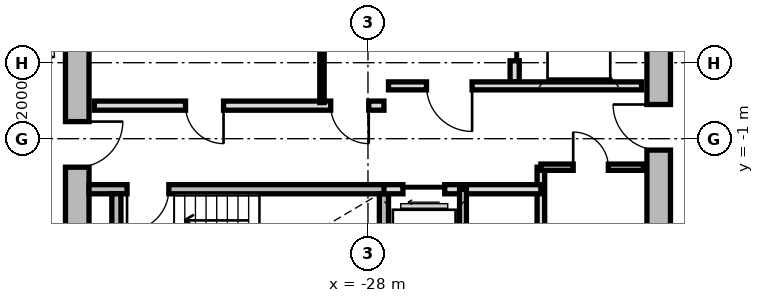
"""IFC4 building model, lengths in metres.
Left out: names, types, materials, properties, quantities, classifications, styles, units other than length and angle.
Written with IfcOpenShell. Run it as: python <this file> out.ifc"""

import sys

from ifc_helpers import new_model, si_unit, direction, frame, frame_2d, origin, place, context, subcontext, project, spatial, rectangle, extrude, source, transform, mapped, element, fill, save


model = new_model("IFC4")
c1 = context("Model", 3, precision=1e-05, world=origin(), true_north=direction((0.0, 1.0)))
c2 = subcontext(c1, "Body", "Model", "MODEL_VIEW")
j1 = project(units=[si_unit("LENGTHUNIT", "METRE"), si_unit("PLANEANGLEUNIT", "RADIAN")], contexts=[c1])
p1 = place(None, origin())
s1 = spatial("IfcSite", under=j1, at=p1, CompositionType="ELEMENT")
p2 = place(p1, origin())
s2 = spatial("IfcBuilding", under=s1, at=p2, CompositionType="ELEMENT")
p3 = place(p2, frame((0.0, 0.0, 134.3)))
s3 = spatial("IfcBuildingStorey", under=s2, at=p3, CompositionType="ELEMENT", Elevation=134.3)
m1 = source(origin(), c2, "Body", "SweptSolid", [
    extrude(rectangle(XDim=11.1, YDim=0.62, at=frame_2d((5.55, 0.0))), origin(), (0.0, 0.0, 1.0), 2.81),
])
p4 = place(p3, frame((-35.65, -5.55, 0.0), z_axis=(0.0, 0.0, 1.0), x_axis=(0.0, 1.0, 0.0)))
e1 = element("IfcWall", 1, at=p4, inside=s3, PredefinedType="SHEAR", context=c2, shape_type="MappedRepresentation", body=[
    mapped(m1, transform((0.0, 0.0, 0.0), x_axis=(1.0, 0.0, 0.0), y_axis=(0.0, 1.0, 0.0), z_axis=(0.0, 0.0, 1.0), scale=1.0)),
])
p5 = place(p4, frame((3.8, 0.0, 0.0)))
e2 = element("IfcOpeningElement", 2, at=p5, cuts=e1, PredefinedType="OPENING", context=c2, shape_type="SweptSolid", body=[
    extrude(rectangle(XDim=1.2, YDim=2.15, at=frame_2d((0.6, 1.075))), frame((0.0, 0.32, 0.0), z_axis=(0.0, -1.0, 0.0), x_axis=(1.0, 0.0, 0.0)), (0.0, 0.0, 1.0), 0.64),
])
p6 = place(p3, frame((-20.35, 5.55, 0.0), z_axis=(0.0, 0.0, 1.0), x_axis=(0.0, -1.0, 0.0)))
e3 = element("IfcWall", 3, at=p6, inside=s3, PredefinedType="SHEAR", context=c2, shape_type="MappedRepresentation", body=[
    mapped(m1, transform((0.0, 0.0, 0.0), x_axis=(1.0, 0.0, 0.0), y_axis=(0.0, 1.0, 0.0), z_axis=(0.0, 0.0, 1.0), scale=1.0)),
])
p7 = place(p6, frame((5.65, 0.0, 0.0)))
e4 = element("IfcOpeningElement", 4, at=p7, cuts=e3, PredefinedType="OPENING", context=c2, shape_type="SweptSolid", body=[
    extrude(rectangle(XDim=1.2, YDim=2.15, at=frame_2d((0.6, 1.075))), frame((0.0, 0.32, 0.0), z_axis=(0.0, -1.0, 0.0), x_axis=(1.0, 0.0, 0.0)), (0.0, 0.0, 1.0), 0.64),
])
p8 = place(p6, frame((9.3, 0.0, 0.0)))
e5 = element("IfcOpeningElement", 5, at=p8, cuts=e3, PredefinedType="OPENING", context=c2, shape_type="SweptSolid", body=[
    extrude(rectangle(XDim=1.0, YDim=2.1, at=frame_2d((0.5, 1.05))), frame((0.0, 0.32, 0.0), z_axis=(0.0, -1.0, 0.0), x_axis=(1.0, 0.0, 0.0)), (0.0, 0.0, 1.0), 0.64),
])
m2 = source(origin(), c2, "Body", "SweptSolid", [
    extrude(rectangle(XDim=7.88, YDim=0.24, at=frame_2d((3.94, 0.0))), origin(), (0.0, 0.0, 1.0), 2.81),
])
p9 = place(p3, frame((-35.34, -2.33, 0.0), z_axis=(0.0, 0.0, 1.0), x_axis=(1.0, 0.0, 0.0)))
e6 = element("IfcWall", 6, at=p9, inside=s3, PredefinedType="PARTITIONING", context=c2, shape_type="MappedRepresentation", body=[
    mapped(m2, transform((0.0, 0.0, 0.0), x_axis=(1.0, 0.0, 0.0), y_axis=(0.0, 1.0, 0.0), z_axis=(0.0, 0.0, 1.0), scale=1.0)),
])
p10 = place(p9, frame((1.0, 0.0, 0.0)))
e7 = element("IfcOpeningElement", 7, at=p10, cuts=e6, PredefinedType="OPENING", context=c2, shape_type="SweptSolid", body=[
    extrude(rectangle(XDim=1.1, YDim=2.15, at=frame_2d((0.55, 1.075))), frame((0.0, 0.13, 0.0), z_axis=(0.0, -1.0, 0.0), x_axis=(1.0, 0.0, 0.0)), (0.0, 0.0, 1.0), 0.26),
])
m3 = source(origin(), c2, "Body", "SweptSolid", [
    extrude(rectangle(XDim=3.19, YDim=0.24, at=frame_2d((1.595, 0.0))), origin(), (0.0, 0.0, 1.0), 2.81),
])
for number, where, z_axis, x_axis in (
    (8, (-34.62, -5.64, 0.0), (0.0, 0.0, 1.0), (0.0, 1.0, 0.0)),
    (9, (-27.58, -5.64, 0.0), (0.0, 0.0, 1.0), (0.0, 1.0, 0.0)),
):
    element("IfcWall", number, at=place(p3, frame(where, z_axis=z_axis, x_axis=x_axis)), inside=s3, PredefinedType="PARTITIONING", context=c2, shape_type="MappedRepresentation", body=[
        mapped(m3, transform((0.0, 0.0, 0.0), x_axis=(1.0, 0.0, 0.0), y_axis=(0.0, 1.0, 0.0), z_axis=(0.0, 0.0, 1.0), scale=1.0)),
    ])
m4 = source(origin(), c2, "Body", "SweptSolid", [
    extrude(rectangle(XDim=5.0, YDim=0.24, at=frame_2d((2.5, 0.0))), origin(), (0.0, 0.0, 1.0), 2.795),
])
p11 = place(p3, frame((-24.14, 0.5, 0.0), z_axis=(0.0, 0.0, 1.0), x_axis=(0.0, 1.0, 0.0)))
e10 = element("IfcWall", 10, at=p11, inside=s3, PredefinedType="PARTITIONING", context=c2, shape_type="MappedRepresentation", body=[
    mapped(m4, transform((0.0, 0.0, 0.0), x_axis=(1.0, 0.0, 0.0), y_axis=(0.0, 1.0, 0.0), z_axis=(0.0, 0.0, 1.0), scale=1.0)),
])
p12 = place(p11, frame((3.05, 0.0, 0.0)))
e11 = element("IfcOpeningElement", 11, at=p12, cuts=e10, PredefinedType="OPENING", context=c2, shape_type="SweptSolid", body=[
    extrude(rectangle(XDim=1.3, YDim=2.2, at=frame_2d((0.65, 1.1))), frame((0.0, 0.13, 0.0), z_axis=(0.0, -1.0, 0.0), x_axis=(1.0, 0.0, 0.0)), (0.0, 0.0, 1.0), 0.26),
])
p13 = place(p11, frame((0.55, 0.0, 0.0)))
e12 = element("IfcOpeningElement", 12, at=p13, cuts=e10, PredefinedType="OPENING", context=c2, shape_type="SweptSolid", body=[
    extrude(rectangle(XDim=1.3, YDim=2.2, at=frame_2d((0.65, 1.1))), frame((0.0, 0.13, 0.0), z_axis=(0.0, -1.0, 0.0), x_axis=(1.0, 0.0, 0.0)), (0.0, 0.0, 1.0), 0.26),
])
m5 = source(origin(), c2, "Body", "SweptSolid", [
    extrude(rectangle(XDim=6.66, YDim=0.21, at=frame_2d((3.33, 0.0))), origin(), (0.0, 0.0, 1.0), 2.795),
])
p14 = place(p3, frame((-27.46, 0.39, 0.0), z_axis=(0.0, 0.0, 1.0), x_axis=(1.0, 0.0, 0.0)))
e13 = element("IfcWall", 13, at=p14, inside=s3, PredefinedType="PARTITIONING", context=c2, shape_type="MappedRepresentation", body=[
    mapped(m5, transform((0.0, 0.0, 0.0), x_axis=(1.0, 0.0, 0.0), y_axis=(0.0, 1.0, 0.0), z_axis=(0.0, 0.0, 1.0), scale=1.0)),
])
p15 = place(p14, frame((1.0, 0.0, 0.0)))
e14 = element("IfcOpeningElement", 14, at=p15, cuts=e13, PredefinedType="OPENING", context=c2, shape_type="SweptSolid", body=[
    extrude(rectangle(XDim=1.2, YDim=2.15, at=frame_2d((0.6, 1.075))), frame((0.0, 0.115, 0.0), z_axis=(0.0, -1.0, 0.0), x_axis=(1.0, 0.0, 0.0)), (0.0, 0.0, 1.0), 0.23),
])
m6 = source(origin(), c2, "Body", "SweptSolid", [
    extrude(rectangle(XDim=7.62, YDim=0.24, at=frame_2d((3.81, 0.0))), origin(), (0.0, 0.0, 1.0), 2.795),
])
p16 = place(p3, frame((-35.2, -0.13, 0.0), z_axis=(0.0, 0.0, 1.0), x_axis=(1.0, 0.0, 0.0)))
e15 = element("IfcWall", 15, at=p16, inside=s3, PredefinedType="PARTITIONING", context=c2, shape_type="MappedRepresentation", body=[
    mapped(m6, transform((0.0, 0.0, 0.0), x_axis=(1.0, 0.0, 0.0), y_axis=(0.0, 1.0, 0.0), z_axis=(0.0, 0.0, 1.0), scale=1.0)),
])
p17 = place(p16, frame((6.22, 0.0, 0.0)))
e16 = element("IfcOpeningElement", 16, at=p17, cuts=e15, PredefinedType="OPENING", context=c2, shape_type="SweptSolid", body=[
    extrude(rectangle(XDim=1.0, YDim=2.1, at=frame_2d((0.5, 1.05))), frame((0.0, 0.13, 0.0), z_axis=(0.0, -1.0, 0.0), x_axis=(1.0, 0.0, 0.0)), (0.0, 0.0, 1.0), 0.26),
])
p18 = place(p16, frame((2.4, 0.0, 0.0)))
e17 = element("IfcOpeningElement", 17, at=p18, cuts=e15, PredefinedType="OPENING", context=c2, shape_type="SweptSolid", body=[
    extrude(rectangle(XDim=1.0, YDim=2.1, at=frame_2d((0.5, 1.05))), frame((0.0, 0.13, 0.0), z_axis=(0.0, -1.0, 0.0), x_axis=(1.0, 0.0, 0.0)), (0.0, 0.0, 1.0), 0.26),
])
m7 = source(origin(), c2, "Body", "SweptSolid", [
    extrude(rectangle(XDim=2.33, YDim=0.115, at=frame_2d((1.165, 0.0))), origin(), (0.0, 0.0, 1.0), 2.795),
])
p19 = place(p3, frame((-29.21, -0.05, 0.0), z_axis=(0.0, 0.0, 1.0), x_axis=(0.0, 1.0, 0.0)))
e18 = element("IfcWall", 18, at=p19, inside=s3, PredefinedType="PARTITIONING", context=c2, shape_type="MappedRepresentation", body=[
    mapped(m7, transform((0.0, 0.0, 0.0), x_axis=(1.0, 0.0, 0.0), y_axis=(0.0, 1.0, 0.0), z_axis=(0.0, 0.0, 1.0), scale=1.0)),
])
m8 = source(origin(), c2, "Body", "SweptSolid", [
    extrude(rectangle(XDim=3.8, YDim=0.2, at=frame_2d((1.9, 0.0))), origin(), (0.0, 0.0, 1.0), 2.795),
])
p20 = place(p3, frame((-23.45, -5.55, 0.0), z_axis=(0.0, 0.0, 1.0), x_axis=(0.0, 1.0, 0.0)))
e19 = element("IfcWall", 19, at=p20, inside=s3, PredefinedType="PARTITIONING", context=c2, shape_type="MappedRepresentation", body=[
    mapped(m8, transform((0.0, 0.0, 0.0), x_axis=(1.0, 0.0, 0.0), y_axis=(0.0, 1.0, 0.0), z_axis=(0.0, 0.0, 1.0), scale=1.0)),
])
m9 = source(origin(), c2, "Body", "SweptSolid", [
    extrude(rectangle(XDim=4.13, YDim=0.24, at=frame_2d((2.065, 0.0))), origin(), (0.0, 0.0, 1.0), 2.795),
])
p21 = place(p3, frame((-27.58, -2.33, 0.0), z_axis=(0.0, 0.0, 1.0), x_axis=(1.0, 0.0, 0.0)))
e20 = element("IfcWall", 20, at=p21, inside=s3, PredefinedType="PARTITIONING", context=c2, shape_type="MappedRepresentation", body=[
    mapped(m9, transform((0.0, 0.0, 0.0), x_axis=(1.0, 0.0, 0.0), y_axis=(0.0, 1.0, 0.0), z_axis=(0.0, 0.0, 1.0), scale=1.0)),
])
p22 = place(p21, frame((0.5, 0.0, 0.0)))
e21 = element("IfcOpeningElement", 21, at=p22, cuts=e20, PredefinedType="OPENING", context=c2, shape_type="SweptSolid", body=[
    extrude(rectangle(XDim=1.1, YDim=2.2, at=frame_2d((0.55, 1.1))), frame((0.0, 0.13, 0.0), z_axis=(0.0, -1.0, 0.0), x_axis=(1.0, 0.0, 0.0)), (0.0, 0.0, 1.0), 0.26),
])
m10 = source(origin(), c2, "Body", "SweptSolid", [
    extrude(rectangle(XDim=3.22, YDim=0.18, at=frame_2d((1.61, 0.0))), origin(), (0.0, 0.0, 1.0), 2.795),
])
p23 = place(p3, frame((-25.5, -5.55, 0.0), z_axis=(0.0, 0.0, 1.0), x_axis=(0.0, 1.0, 0.0)))
e22 = element("IfcWall", 22, at=p23, inside=s3, PredefinedType="PARTITIONING", context=c2, shape_type="MappedRepresentation", body=[
    mapped(m10, transform((0.0, 0.0, 0.0), x_axis=(1.0, 0.0, 0.0), y_axis=(0.0, 1.0, 0.0), z_axis=(0.0, 0.0, 1.0), scale=1.0)),
])
m11 = source(origin(), c2, "Body", "SweptSolid", [
    extrude(rectangle(XDim=2.7, YDim=0.165, at=frame_2d((1.35, 0.0))), origin(), (0.0, 0.0, 1.0), 2.795),
])
p24 = place(p3, frame((-23.45, -1.75, 0.0), z_axis=(0.0, 0.0, 1.0), x_axis=(1.0, 0.0, 0.0)))
e23 = element("IfcWall", 23, at=p24, inside=s3, PredefinedType="PARTITIONING", context=c2, shape_type="MappedRepresentation", body=[
    mapped(m11, transform((0.0, 0.0, 0.0), x_axis=(1.0, 0.0, 0.0), y_axis=(0.0, 1.0, 0.0), z_axis=(0.0, 0.0, 1.0), scale=1.0)),
])
p25 = place(p24, frame((0.85, 0.0, 0.0)))
e24 = element("IfcOpeningElement", 24, at=p25, cuts=e23, PredefinedType="OPENING", context=c2, shape_type="SweptSolid", body=[
    extrude(rectangle(XDim=0.925, YDim=2.1, at=frame_2d((0.462, 1.05))), frame((0.0, 0.093, 0.0), z_axis=(0.0, -1.0, 0.0), x_axis=(1.0, 0.0, 0.0)), (0.0, 0.0, 1.0), 0.185),
])
m12 = source(origin(), c2, "Body", "SweptSolid", [
    extrude(rectangle(XDim=1.1, YDim=2.15, at=frame_2d((0.55, 1.075))), frame((0.0, 0.025, 0.0), z_axis=(0.0, -1.0, 0.0), x_axis=(1.0, 0.0, 0.0)), (0.0, 0.0, 1.0), 0.05),
])
p26 = place(p10, frame((1.1, 0.0, 0.0), z_axis=(0.0, 0.0, 1.0), x_axis=(-1.0, 0.0, 0.0)))
e25 = element("IfcDoor", 25, at=p26, inside=s3, OperationType="SINGLE_SWING_RIGHT", PredefinedType="DOOR", context=c2, shape_type="MappedRepresentation", body=[
    mapped(m12, transform((0.0, 0.0, 0.0), x_axis=(1.0, 0.0, 0.0), y_axis=(0.0, 1.0, 0.0), z_axis=(0.0, 0.0, 1.0), scale=1.0)),
])
fill(e7, e25)
m13 = source(origin(), c2, "Body", "SweptSolid", [
    extrude(rectangle(XDim=1.3, YDim=2.2, at=frame_2d((0.65, 1.1))), frame((0.0, 0.025, 0.0), z_axis=(0.0, -1.0, 0.0), x_axis=(1.0, 0.0, 0.0)), (0.0, 0.0, 1.0), 0.05),
])
p27 = place(p13, origin())
e26 = element("IfcDoor", 26, at=p27, inside=s3, OperationType="SLIDING_TO_RIGHT", PredefinedType="DOOR", context=c2, shape_type="MappedRepresentation", body=[
    mapped(m13, transform((0.0, 0.0, 0.0), x_axis=(1.0, 0.0, 0.0), y_axis=(0.0, 1.0, 0.0), z_axis=(0.0, 0.0, 1.0), scale=1.0)),
])
fill(e12, e26)
m14 = source(origin(), c2, "Body", "SweptSolid", [
    extrude(rectangle(XDim=1.2, YDim=2.15, at=frame_2d((0.6, 1.075))), frame((0.0, 0.025, 0.0), z_axis=(0.0, -1.0, 0.0), x_axis=(1.0, 0.0, 0.0)), (0.0, 0.0, 1.0), 0.05),
])
p28 = place(p15, frame((1.2, 0.0, 0.0), z_axis=(0.0, 0.0, 1.0), x_axis=(-1.0, 0.0, 0.0)))
e27 = element("IfcDoor", 27, at=p28, inside=s3, OperationType="SINGLE_SWING_LEFT", PredefinedType="DOOR", context=c2, shape_type="MappedRepresentation", body=[
    mapped(m14, transform((0.0, 0.0, 0.0), x_axis=(1.0, 0.0, 0.0), y_axis=(0.0, 1.0, 0.0), z_axis=(0.0, 0.0, 1.0), scale=1.0)),
])
fill(e14, e27)
p29 = place(p5, frame((1.2, 0.0, 0.0), z_axis=(0.0, 0.0, 1.0), x_axis=(-1.0, 0.0, 0.0)))
e28 = element("IfcDoor", 28, at=p29, inside=s3, OperationType="SINGLE_SWING_LEFT", PredefinedType="DOOR", context=c2, shape_type="MappedRepresentation", body=[
    mapped(m14, transform((0.0, 0.0, 0.0), x_axis=(1.0, 0.0, 0.0), y_axis=(0.0, 1.0, 0.0), z_axis=(0.0, 0.0, 1.0), scale=1.0)),
])
fill(e2, e28)
p30 = place(p7, frame((1.2, 0.0, 0.0), z_axis=(0.0, 0.0, 1.0), x_axis=(-1.0, 0.0, 0.0)))
e29 = element("IfcDoor", 29, at=p30, inside=s3, OperationType="SINGLE_SWING_RIGHT", PredefinedType="DOOR", context=c2, shape_type="MappedRepresentation", body=[
    mapped(m14, transform((0.0, 0.0, 0.0), x_axis=(1.0, 0.0, 0.0), y_axis=(0.0, 1.0, 0.0), z_axis=(0.0, 0.0, 1.0), scale=1.0)),
])
fill(e4, e29)
m15 = source(origin(), c2, "Body", "SweptSolid", [
    extrude(rectangle(XDim=1.0, YDim=2.1, at=frame_2d((0.5, 1.05))), frame((0.0, 0.025, 0.0), z_axis=(0.0, -1.0, 0.0), x_axis=(1.0, 0.0, 0.0)), (0.0, 0.0, 1.0), 0.05),
])
p31 = place(p17, frame((1.0, 0.0, 0.0), z_axis=(0.0, 0.0, 1.0), x_axis=(-1.0, 0.0, 0.0)))
e30 = element("IfcDoor", 30, at=p31, inside=s3, OperationType="SINGLE_SWING_LEFT", PredefinedType="DOOR", context=c2, shape_type="MappedRepresentation", body=[
    mapped(m15, transform((0.0, 0.0, 0.0), x_axis=(1.0, 0.0, 0.0), y_axis=(0.0, 1.0, 0.0), z_axis=(0.0, 0.0, 1.0), scale=1.0)),
])
fill(e16, e30)
p32 = place(p18, frame((1.0, 0.0, 0.0), z_axis=(0.0, 0.0, 1.0), x_axis=(-1.0, 0.0, 0.0)))
e31 = element("IfcDoor", 31, at=p32, inside=s3, OperationType="SINGLE_SWING_LEFT", PredefinedType="DOOR", context=c2, shape_type="MappedRepresentation", body=[
    mapped(m15, transform((0.0, 0.0, 0.0), x_axis=(1.0, 0.0, 0.0), y_axis=(0.0, 1.0, 0.0), z_axis=(0.0, 0.0, 1.0), scale=1.0)),
])
fill(e17, e31)
m16 = source(origin(), c2, "Body", "SweptSolid", [
    extrude(rectangle(XDim=1.1, YDim=2.2, at=frame_2d((0.55, 1.1))), frame((0.0, 0.025, 0.0), z_axis=(0.0, -1.0, 0.0), x_axis=(1.0, 0.0, 0.0)), (0.0, 0.0, 1.0), 0.05),
])
p33 = place(p22, frame((1.1, 0.0, 0.0), z_axis=(0.0, 0.0, 1.0), x_axis=(-1.0, 0.0, 0.0)))
e32 = element("IfcDoor", 32, at=p33, inside=s3, OperationType="SLIDING_TO_LEFT", PredefinedType="DOOR", context=c2, shape_type="MappedRepresentation", body=[
    mapped(m16, transform((0.0, 0.0, 0.0), x_axis=(1.0, 0.0, 0.0), y_axis=(0.0, 1.0, 0.0), z_axis=(0.0, 0.0, 1.0), scale=1.0)),
])
fill(e21, e32)
m17 = source(origin(), c2, "Body", "SweptSolid", [
    extrude(rectangle(XDim=0.925, YDim=2.1, at=frame_2d((0.462, 1.05))), frame((0.0, 0.025, 0.0), z_axis=(0.0, -1.0, 0.0), x_axis=(1.0, 0.0, 0.0)), (0.0, 0.0, 1.0), 0.05),
])
p34 = place(p25, origin())
e33 = element("IfcDoor", 33, at=p34, inside=s3, OperationType="SINGLE_SWING_LEFT", PredefinedType="DOOR", context=c2, shape_type="MappedRepresentation", body=[
    mapped(m17, transform((0.0, 0.0, 0.0), x_axis=(1.0, 0.0, 0.0), y_axis=(0.0, 1.0, 0.0), z_axis=(0.0, 0.0, 1.0), scale=1.0)),
])
fill(e24, e33)
save(model, sys.argv[1])
